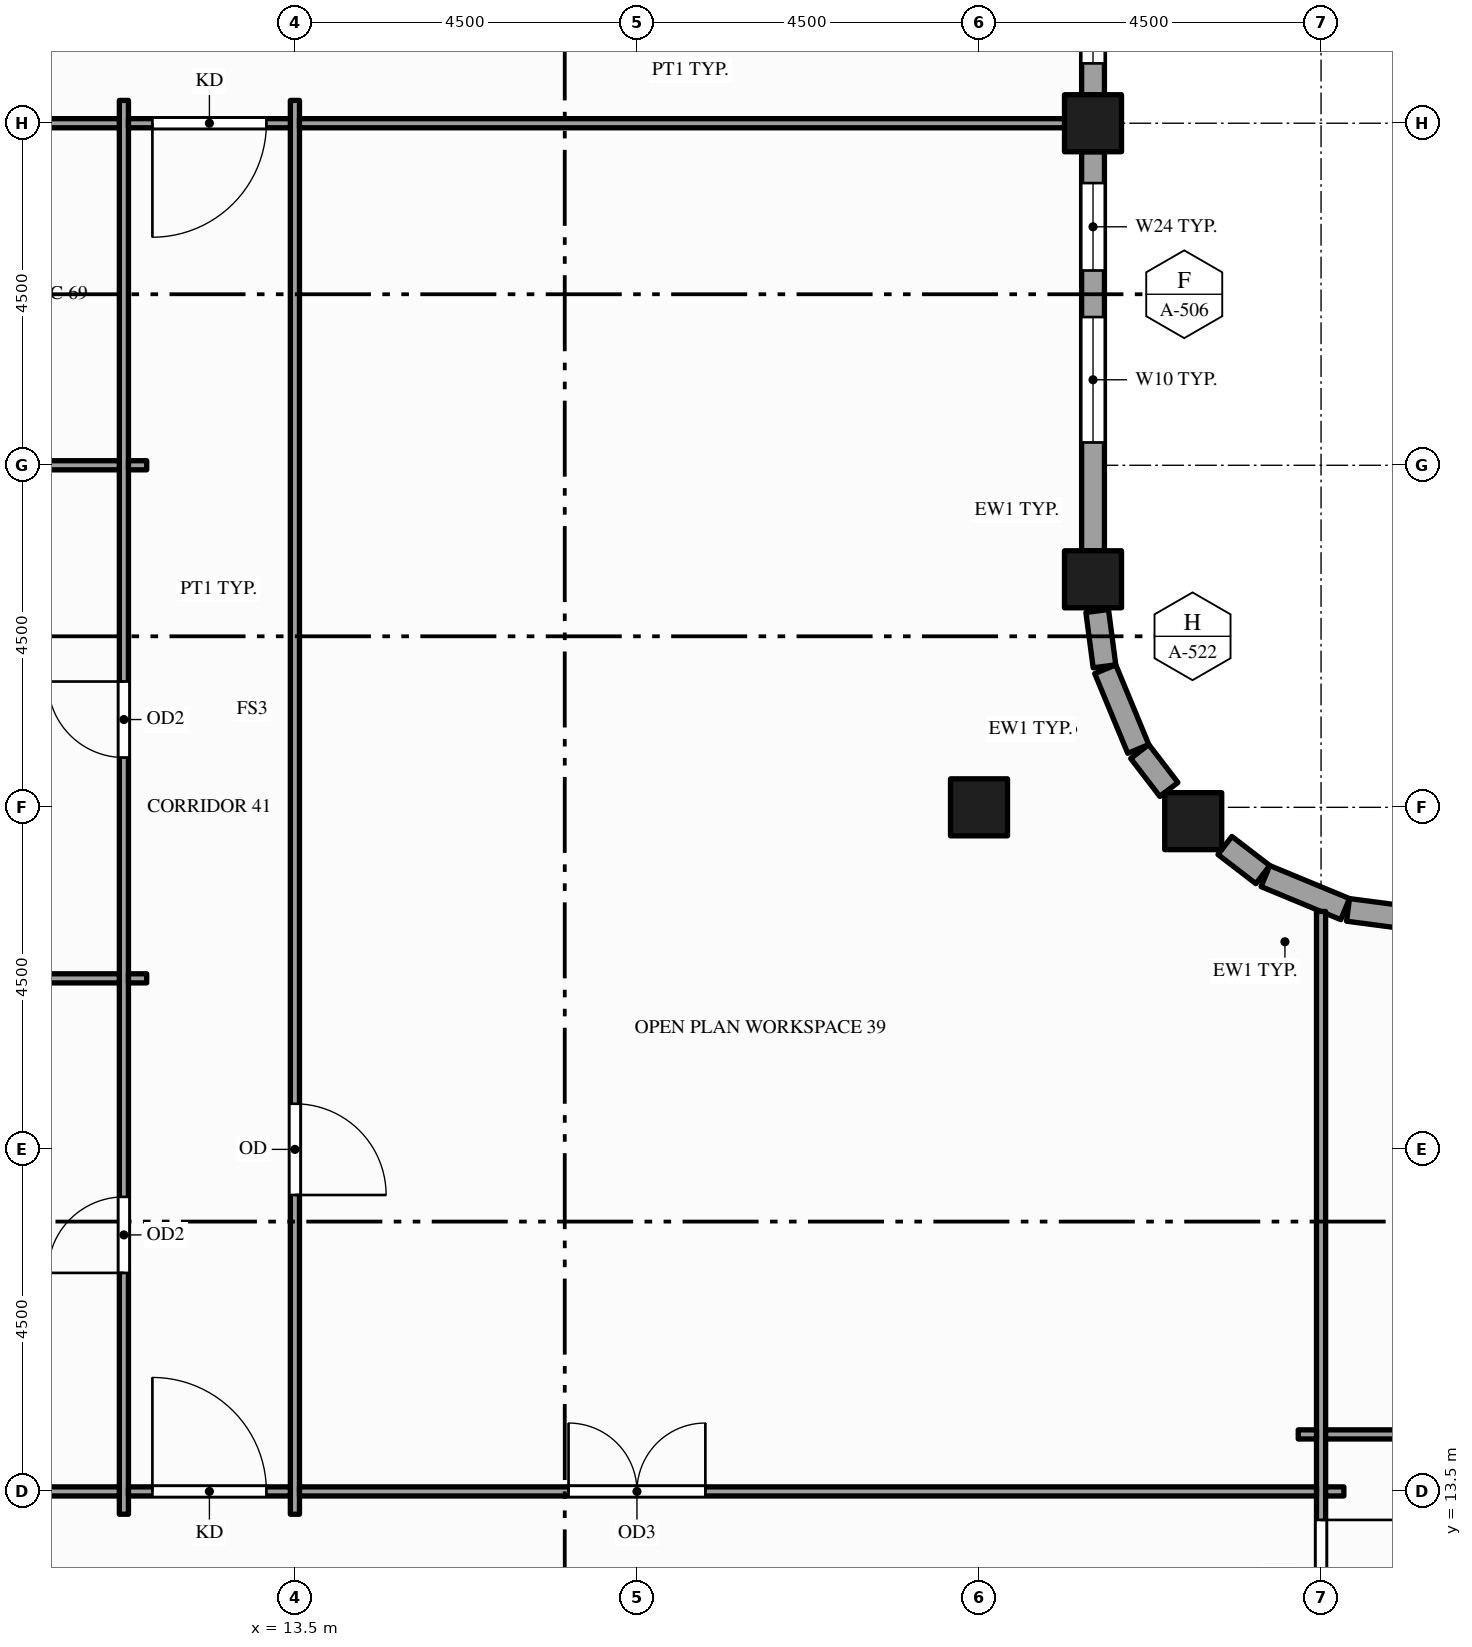
"""IFC4 building model, lengths in metres.
Left out: names, types, materials, properties, quantities, classifications, styles, units other than length and angle.
Written with IfcOpenShell. Run it as: python <this file> out.ifc"""

import sys

from ifc_helpers import new_model, si_unit, direction, frame, frame_2d, origin, origin_2d, place, context, subcontext, project, spatial, rectangle, hollow_rectangle, extrude, element, fill, save


model = new_model("IFC4")
c1 = context("Model", 3, precision=1e-05, world=origin(), true_north=direction((0.0, 1.0)))
c2 = subcontext(c1, "Body", "Model", "MODEL_VIEW")
j1 = project(units=[si_unit("LENGTHUNIT", "METRE"), si_unit("PLANEANGLEUNIT", "RADIAN")], contexts=[c1])
p1 = place(None, origin())
s1 = spatial("IfcSite", under=j1, at=p1, CompositionType="ELEMENT")
p2 = place(p1, origin())
s2 = spatial("IfcBuilding", under=s1, at=p2, CompositionType="ELEMENT")
p3 = place(p2, frame((0.0, 0.0, 211.0)))
s3 = spatial("IfcBuildingStorey", under=s2, at=p3, CompositionType="ELEMENT", Elevation=211.0)
for number, where, z_axis, x_axis in (
    (1, (22.5, 22.5, -0.15), (0.0, 0.0, 1.0), (1.0, 0.0, 0.0)),
    (2, (24.0, 25.5, -0.15), (0.0, 0.0, 1.0), (1.0, 0.0, 0.0)),
    (3, (24.0, 31.5, -0.15), (0.0, 0.0, 1.0), (1.0, 0.0, 0.0)),
    (4, (25.318, 22.318, -0.15), (0.0, 0.0, 1.0), (1.0, 0.0, 0.0)),
):
    element("IfcColumn", number, at=place(p3, frame(where, z_axis=z_axis, x_axis=x_axis)), inside=s3, PredefinedType="COLUMN", context=c2, shape_type="SweptSolid", body=[
        extrude(hollow_rectangle(XDim=0.75, YDim=0.75, WallThickness=0.036, at=origin_2d()), origin(), (0.0, 0.0, 1.0), 4.0),
    ])
p4 = place(p3, frame((28.083, 21.055, 0.0), z_axis=(0.0, 0.0, 1.0), x_axis=(-0.99142711513, 0.130660917588, 0.0)))
e5 = element("IfcWall", 5, at=p4, inside=s3, PredefinedType="STANDARD", context=c2, shape_type="SweptSolid", body=[
    extrude(rectangle(XDim=0.734, YDim=0.3, at=frame_2d((0.367, 0.0))), origin(), (0.0, 0.0, 1.0), 3.157),
])
p5 = place(p3, frame((27.317, 21.161, 0.0), z_axis=(0.0, 0.0, 1.0), x_axis=(-0.923914616768, 0.382598720491, 0.0)))
e6 = element("IfcWall", 6, at=p5, inside=s3, PredefinedType="STANDARD", context=c2, shape_type="SweptSolid", body=[
    extrude(rectangle(XDim=1.135, YDim=0.3, at=frame_2d((0.568, 0.0))), origin(), (0.0, 0.0, 1.0), 2.87),
])
p6 = place(p3, frame((26.234, 21.615, 0.0), z_axis=(0.0, 0.0, 1.0), x_axis=(-0.793575131083, 0.608472276547, 0.0)))
e7 = element("IfcWall", 7, at=p6, inside=s3, PredefinedType="STANDARD", context=c2, shape_type="SweptSolid", body=[
    extrude(rectangle(XDim=0.629, YDim=0.3, at=frame_2d((0.314, 0.0))), origin(), (0.0, 0.0, 1.0), 3.157),
])
p7 = place(p3, frame((24.998, 22.735, 0.0), z_axis=(0.0, 0.0, 1.0), x_axis=(-0.608472276547, 0.793575131083, 0.0)))
e8 = element("IfcWall", 8, at=p7, inside=s3, PredefinedType="STANDARD", context=c2, shape_type="SweptSolid", body=[
    extrude(rectangle(XDim=0.629, YDim=0.3, at=frame_2d((0.314, 0.0))), origin(), (0.0, 0.0, 1.0), 2.76),
])
p8 = place(p3, frame((24.595, 23.268, 0.0), z_axis=(0.0, 0.0, 1.0), x_axis=(-0.382598720491, 0.923914616768, 0.0)))
e9 = element("IfcWall", 9, at=p8, inside=s3, PredefinedType="STANDARD", context=c2, shape_type="SweptSolid", body=[
    extrude(rectangle(XDim=1.135, YDim=0.3, at=frame_2d((0.568, 0.0))), origin(), (0.0, 0.0, 1.0), 2.76),
])
p9 = place(p3, frame((24.151, 24.355, 0.0), z_axis=(0.0, 0.0, 1.0), x_axis=(-0.130660917588, 0.99142711513, 0.0)))
e10 = element("IfcWall", 10, at=p9, inside=s3, PredefinedType="STANDARD", context=c2, shape_type="SweptSolid", body=[
    extrude(rectangle(XDim=0.734, YDim=0.3, at=frame_2d((0.367, 0.0))), origin(), (0.0, 0.0, 1.0), 3.157),
])
p10 = place(p3, frame((24.0, 25.875, 0.0), z_axis=(0.0, 0.0, 1.0), x_axis=(0.0, 1.0, 0.0)))
e11 = element("IfcWall", 11, at=p10, inside=s3, PredefinedType="STANDARD", context=c2, shape_type="SweptSolid", body=[
    extrude(rectangle(XDim=5.25, YDim=0.3, at=frame_2d((2.625, 0.0))), origin(), (0.0, 0.0, 1.0), 3.157),
])
p11 = place(p10, frame((1.425, 0.0, 0.9)))
e12 = element("IfcOpeningElement", 12, at=p11, cuts=e11, PredefinedType="OPENING", context=c2, shape_type="SweptSolid", body=[
    extrude(rectangle(XDim=1.65, YDim=2.0, at=frame_2d((0.825, 1.0))), frame((0.0, 0.16, 0.0), z_axis=(0.0, -1.0, 0.0), x_axis=(1.0, 0.0, 0.0)), (0.0, 0.0, 1.0), 0.32),
])
p12 = place(p10, frame((3.688, 0.0, 0.9)))
e13 = element("IfcOpeningElement", 13, at=p12, cuts=e11, PredefinedType="OPENING", context=c2, shape_type="SweptSolid", body=[
    extrude(rectangle(XDim=1.15, YDim=2.0, at=frame_2d((0.575, 1.0))), frame((0.0, 0.16, 0.0), z_axis=(0.0, -1.0, 0.0), x_axis=(1.0, 0.0, 0.0)), (0.0, 0.0, 1.0), 0.32),
])
p13 = place(p3, frame((24.0, 31.875, 0.0), z_axis=(0.0, 0.0, 1.0), x_axis=(0.0, 1.0, 0.0)))
e14 = element("IfcWall", 14, at=p13, inside=s3, PredefinedType="STANDARD", context=c2, shape_type="SweptSolid", body=[
    extrude(rectangle(XDim=3.75, YDim=0.3, at=frame_2d((1.875, 0.0))), origin(), (0.0, 0.0, 1.0), 3.157),
])
p14 = place(p13, frame((0.413, 0.0, 0.9)))
e15 = element("IfcOpeningElement", 15, at=p14, cuts=e14, PredefinedType="OPENING", context=c2, shape_type="SweptSolid", body=[
    extrude(rectangle(XDim=1.15, YDim=2.0, at=frame_2d((0.575, 1.0))), frame((0.0, 0.16, 0.0), z_axis=(0.0, -1.0, 0.0), x_axis=(1.0, 0.0, 0.0)), (0.0, 0.0, 1.0), 0.32),
])
p15 = place(p13, frame((2.188, 0.0, 0.9)))
e16 = element("IfcOpeningElement", 16, at=p15, cuts=e14, PredefinedType="OPENING", context=c2, shape_type="SweptSolid", body=[
    extrude(rectangle(XDim=1.15, YDim=2.0, at=frame_2d((0.575, 1.0))), frame((0.0, 0.16, 0.0), z_axis=(0.0, -1.0, 0.0), x_axis=(1.0, 0.0, 0.0)), (0.0, 0.0, 1.0), 0.32),
])
p16 = place(p3, frame((11.25, 13.2, 0.0), z_axis=(0.0, 0.0, 1.0), x_axis=(0.0, 1.0, 0.0)))
e17 = element("IfcWall", 17, at=p16, inside=s3, PredefinedType="PARTITIONING", context=c2, shape_type="SweptSolid", body=[
    extrude(rectangle(XDim=18.6, YDim=0.12, at=frame_2d((9.3, 0.0))), origin(), (0.0, 0.0, 1.0), 2.6),
])
p17 = place(p16, frame((3.175, 0.0, 0.0)))
e18 = element("IfcOpeningElement", 18, at=p17, cuts=e17, PredefinedType="OPENING", context=c2, shape_type="SweptSolid", body=[
    extrude(rectangle(XDim=1.0, YDim=2.1, at=frame_2d((0.5, 1.05))), frame((0.0, 0.07, 0.0), z_axis=(0.0, -1.0, 0.0), x_axis=(1.0, 0.0, 0.0)), (0.0, 0.0, 1.0), 0.14),
])
p18 = place(p16, frame((9.955, 0.0, 0.0)))
e19 = element("IfcOpeningElement", 19, at=p18, cuts=e17, PredefinedType="OPENING", context=c2, shape_type="SweptSolid", body=[
    extrude(rectangle(XDim=1.0, YDim=2.1, at=frame_2d((0.5, 1.05))), frame((0.0, 0.07, 0.0), z_axis=(0.0, -1.0, 0.0), x_axis=(1.0, 0.0, 0.0)), (0.0, 0.0, 1.0), 0.14),
])
p19 = place(p3, frame((13.5, 13.2, 0.0), z_axis=(0.0, 0.0, 1.0), x_axis=(0.0, 1.0, 0.0)))
e20 = element("IfcWall", 20, at=p19, inside=s3, PredefinedType="PARTITIONING", context=c2, shape_type="SweptSolid", body=[
    extrude(rectangle(XDim=18.6, YDim=0.12, at=frame_2d((9.3, 0.0))), origin(), (0.0, 0.0, 1.0), 2.6),
])
p20 = place(p19, frame((4.2, 0.0, 0.0)))
e21 = element("IfcOpeningElement", 21, at=p20, cuts=e20, PredefinedType="OPENING", context=c2, shape_type="SweptSolid", body=[
    extrude(rectangle(XDim=1.2, YDim=2.1, at=frame_2d((0.6, 1.05))), frame((0.0, 0.07, 0.0), z_axis=(0.0, -1.0, 0.0), x_axis=(1.0, 0.0, 0.0)), (0.0, 0.0, 1.0), 0.14),
])
p21 = place(p3, frame((27.0, -1.35, 0.0), z_axis=(0.0, 0.0, 1.0), x_axis=(0.0, 1.0, 0.0)))
e22 = element("IfcWall", 22, at=p21, inside=s3, PredefinedType="PARTITIONING", context=c2, shape_type="SweptSolid", body=[
    extrude(rectangle(XDim=22.48, YDim=0.12, at=frame_2d((11.24, 0.0))), origin(), (0.0, 0.0, 1.0), 2.87),
])
p22 = place(p21, frame((12.975, 0.0, 0.0)))
e23 = element("IfcOpeningElement", 23, at=p22, cuts=e22, PredefinedType="OPENING", context=c2, shape_type="SweptSolid", body=[
    extrude(rectangle(XDim=1.5, YDim=2.1, at=frame_2d((0.75, 1.05))), frame((0.0, 0.07, 0.0), z_axis=(0.0, -1.0, 0.0), x_axis=(1.0, 0.0, 0.0)), (0.0, 0.0, 1.0), 0.14),
])
p23 = place(p3, frame((0.15, 13.5, 0.0), z_axis=(0.0, 0.0, 1.0), x_axis=(1.0, 0.0, 0.0)))
e24 = element("IfcWall", 24, at=p23, inside=s3, PredefinedType="PARTITIONING", context=c2, shape_type="SweptSolid", body=[
    extrude(rectangle(XDim=11.04, YDim=0.12, at=frame_2d((5.52, 0.0))), origin(), (0.0, 0.0, 1.0), 2.87),
])
p24 = place(p3, frame((11.31, 13.5, 0.0), z_axis=(0.0, 0.0, 1.0), x_axis=(1.0, 0.0, 0.0)))
e25 = element("IfcWall", 25, at=p24, inside=s3, PredefinedType="PARTITIONING", context=c2, shape_type="SweptSolid", body=[
    extrude(rectangle(XDim=2.13, YDim=0.12, at=frame_2d((1.065, 0.0))), origin(), (0.0, 0.0, 1.0), 2.87),
])
p25 = place(p24, frame((0.315, 0.0, 0.0)))
e26 = element("IfcOpeningElement", 26, at=p25, cuts=e25, PredefinedType="OPENING", context=c2, shape_type="SweptSolid", body=[
    extrude(rectangle(XDim=1.5, YDim=2.1, at=frame_2d((0.75, 1.05))), frame((0.0, 0.07, 0.0), z_axis=(0.0, -1.0, 0.0), x_axis=(1.0, 0.0, 0.0)), (0.0, 0.0, 1.0), 0.14),
])
p26 = place(p3, frame((13.56, 13.5, 0.0), z_axis=(0.0, 0.0, 1.0), x_axis=(1.0, 0.0, 0.0)))
e27 = element("IfcWall", 27, at=p26, inside=s3, PredefinedType="PARTITIONING", context=c2, shape_type="SweptSolid", body=[
    extrude(rectangle(XDim=13.38, YDim=0.12, at=frame_2d((6.69, 0.0))), origin(), (0.0, 0.0, 1.0), 2.76),
])
p27 = place(p26, frame((3.54, 0.0, 0.0)))
e28 = element("IfcOpeningElement", 28, at=p27, cuts=e27, PredefinedType="OPENING", context=c2, shape_type="SweptSolid", body=[
    extrude(rectangle(XDim=1.8, YDim=2.1, at=frame_2d((0.9, 1.05))), frame((0.0, 0.07, 0.0), z_axis=(0.0, -1.0, 0.0), x_axis=(1.0, 0.0, 0.0)), (0.0, 0.0, 1.0), 0.14),
])
for number, where, z_axis, x_axis in (
    (29, (27.06, 13.5, 0.0), (0.0, 0.0, 1.0), (1.0, 0.0, 0.0)),
    (30, (26.7, 14.25, 0.0), (0.0, 0.0, 1.0), (1.0, 0.0, 0.0)),
):
    element("IfcWall", number, at=place(p3, frame(where, z_axis=z_axis, x_axis=x_axis)), inside=s3, PredefinedType="PARTITIONING", context=c2, shape_type="SweptSolid", body=[
        extrude(rectangle(XDim=0.24, YDim=0.12, at=frame_2d((0.12, 0.0))), origin(), (0.0, 0.0, 1.0), 2.87),
    ])
p28 = place(p3, frame((27.06, 14.25, 0.0), z_axis=(0.0, 0.0, 1.0), x_axis=(1.0, 0.0, 0.0)))
e31 = element("IfcWall", 31, at=p28, inside=s3, PredefinedType="PARTITIONING", context=c2, shape_type="SweptSolid", body=[
    extrude(rectangle(XDim=2.13, YDim=0.12, at=frame_2d((1.065, 0.0))), origin(), (0.0, 0.0, 1.0), 2.87),
])
p29 = place(p3, frame((0.15, 20.25, 0.0), z_axis=(0.0, 0.0, 1.0), x_axis=(1.0, 0.0, 0.0)))
e32 = element("IfcWall", 32, at=p29, inside=s3, PredefinedType="PARTITIONING", context=c2, shape_type="SweptSolid", body=[
    extrude(rectangle(XDim=11.04, YDim=0.12, at=frame_2d((5.52, 0.0))), origin(), (0.0, 0.0, 1.0), 2.87),
])
p30 = place(p3, frame((11.31, 20.25, 0.0), z_axis=(0.0, 0.0, 1.0), x_axis=(1.0, 0.0, 0.0)))
e33 = element("IfcWall", 33, at=p30, inside=s3, PredefinedType="PARTITIONING", context=c2, shape_type="SweptSolid", body=[
    extrude(rectangle(XDim=0.24, YDim=0.12, at=frame_2d((0.12, 0.0))), origin(), (0.0, 0.0, 1.0), 2.87),
])
p31 = place(p3, frame((8.06, 27.0, 0.0), z_axis=(0.0, 0.0, 1.0), x_axis=(1.0, 0.0, 0.0)))
e34 = element("IfcWall", 34, at=p31, inside=s3, PredefinedType="PARTITIONING", context=c2, shape_type="SweptSolid", body=[
    extrude(rectangle(XDim=3.13, YDim=0.12, at=frame_2d((1.565, 0.0))), origin(), (0.0, 0.0, 1.0), 2.87),
])
p32 = place(p3, frame((11.31, 27.0, 0.0), z_axis=(0.0, 0.0, 1.0), x_axis=(1.0, 0.0, 0.0)))
e35 = element("IfcWall", 35, at=p32, inside=s3, PredefinedType="PARTITIONING", context=c2, shape_type="SweptSolid", body=[
    extrude(rectangle(XDim=0.24, YDim=0.12, at=frame_2d((0.12, 0.0))), origin(), (0.0, 0.0, 1.0), 2.87),
])
p33 = place(p3, frame((8.06, 31.5, 0.0), z_axis=(0.0, 0.0, 1.0), x_axis=(1.0, 0.0, 0.0)))
e36 = element("IfcWall", 36, at=p33, inside=s3, PredefinedType="PARTITIONING", context=c2, shape_type="SweptSolid", body=[
    extrude(rectangle(XDim=3.13, YDim=0.12, at=frame_2d((1.565, 0.0))), origin(), (0.0, 0.0, 1.0), 2.87),
])
p34 = place(p33, frame((1.065, 0.0, 0.0)))
e37 = element("IfcOpeningElement", 37, at=p34, cuts=e36, PredefinedType="OPENING", context=c2, shape_type="SweptSolid", body=[
    extrude(rectangle(XDim=1.0, YDim=2.1, at=frame_2d((0.5, 1.05))), frame((0.0, 0.07, 0.0), z_axis=(0.0, -1.0, 0.0), x_axis=(1.0, 0.0, 0.0)), (0.0, 0.0, 1.0), 0.14),
])
p35 = place(p3, frame((11.31, 31.5, 0.0), z_axis=(0.0, 0.0, 1.0), x_axis=(1.0, 0.0, 0.0)))
e38 = element("IfcWall", 38, at=p35, inside=s3, PredefinedType="PARTITIONING", context=c2, shape_type="SweptSolid", body=[
    extrude(rectangle(XDim=2.13, YDim=0.12, at=frame_2d((1.065, 0.0))), origin(), (0.0, 0.0, 1.0), 2.87),
])
p36 = place(p35, frame((0.315, 0.0, 0.0)))
e39 = element("IfcOpeningElement", 39, at=p36, cuts=e38, PredefinedType="OPENING", context=c2, shape_type="SweptSolid", body=[
    extrude(rectangle(XDim=1.5, YDim=2.1, at=frame_2d((0.75, 1.05))), frame((0.0, 0.07, 0.0), z_axis=(0.0, -1.0, 0.0), x_axis=(1.0, 0.0, 0.0)), (0.0, 0.0, 1.0), 0.14),
])
p37 = place(p3, frame((13.56, 31.5, 0.0), z_axis=(0.0, 0.0, 1.0), x_axis=(1.0, 0.0, 0.0)))
e40 = element("IfcWall", 40, at=p37, inside=s3, PredefinedType="PARTITIONING", context=c2, shape_type="SweptSolid", body=[
    extrude(rectangle(XDim=10.29, YDim=0.12, at=frame_2d((5.145, 0.0))), origin(), (0.0, 0.0, 1.0), 2.87),
])
p38 = place(p11, origin())
e41 = element("IfcWindow", 41, at=p38, inside=s3, PartitioningType="SINGLE_PANEL", PredefinedType="WINDOW", context=c2, shape_type="SweptSolid", body=[
    extrude(rectangle(XDim=1.65, YDim=2.0, at=frame_2d((0.825, 1.0))), frame((0.0, 0.03, 0.0), z_axis=(0.0, -1.0, 0.0), x_axis=(1.0, 0.0, 0.0)), (0.0, 0.0, 1.0), 0.06),
])
fill(e12, e41)
p39 = place(p12, origin())
e42 = element("IfcWindow", 42, at=p39, inside=s3, PartitioningType="SINGLE_PANEL", PredefinedType="WINDOW", context=c2, shape_type="SweptSolid", body=[
    extrude(rectangle(XDim=1.15, YDim=2.0, at=frame_2d((0.575, 1.0))), frame((0.0, 0.03, 0.0), z_axis=(0.0, -1.0, 0.0), x_axis=(1.0, 0.0, 0.0)), (0.0, 0.0, 1.0), 0.06),
])
fill(e13, e42)
p40 = place(p14, origin())
e43 = element("IfcWindow", 43, at=p40, inside=s3, PartitioningType="SINGLE_PANEL", PredefinedType="WINDOW", context=c2, shape_type="SweptSolid", body=[
    extrude(rectangle(XDim=1.15, YDim=2.0, at=frame_2d((0.575, 1.0))), frame((0.0, 0.03, 0.0), z_axis=(0.0, -1.0, 0.0), x_axis=(1.0, 0.0, 0.0)), (0.0, 0.0, 1.0), 0.06),
])
fill(e15, e43)
p41 = place(p22, origin())
e44 = element("IfcDoor", 44, at=p41, inside=s3, OperationType="SINGLE_SWING_RIGHT", PredefinedType="DOOR", context=c2, shape_type="SweptSolid", body=[
    extrude(rectangle(XDim=1.5, YDim=2.1, at=frame_2d((0.75, 1.05))), frame((0.0, 0.025, 0.0), z_axis=(0.0, -1.0, 0.0), x_axis=(1.0, 0.0, 0.0)), (0.0, 0.0, 1.0), 0.05),
])
fill(e23, e44)
p42 = place(p27, origin())
e45 = element("IfcDoor", 45, at=p42, inside=s3, OperationType="DOUBLE_DOOR_SINGLE_SWING", PredefinedType="DOOR", context=c2, shape_type="SweptSolid", body=[
    extrude(rectangle(XDim=1.8, YDim=2.1, at=frame_2d((0.9, 1.05))), frame((0.0, 0.025, 0.0), z_axis=(0.0, -1.0, 0.0), x_axis=(1.0, 0.0, 0.0)), (0.0, 0.0, 1.0), 0.05),
])
fill(e28, e45)
p43 = place(p25, origin())
e46 = element("IfcDoor", 46, at=p43, inside=s3, OperationType="SINGLE_SWING_LEFT", PredefinedType="DOOR", context=c2, shape_type="SweptSolid", body=[
    extrude(rectangle(XDim=1.5, YDim=2.1, at=frame_2d((0.75, 1.05))), frame((0.0, 0.025, 0.0), z_axis=(0.0, -1.0, 0.0), x_axis=(1.0, 0.0, 0.0)), (0.0, 0.0, 1.0), 0.05),
])
fill(e26, e46)
p44 = place(p36, origin())
e47 = element("IfcDoor", 47, at=p44, inside=s3, OperationType="SINGLE_SWING_LEFT", PredefinedType="DOOR", context=c2, shape_type="SweptSolid", body=[
    extrude(rectangle(XDim=1.5, YDim=2.1, at=frame_2d((0.75, 1.05))), frame((0.0, 0.025, 0.0), z_axis=(0.0, -1.0, 0.0), x_axis=(1.0, 0.0, 0.0)), (0.0, 0.0, 1.0), 0.05),
])
fill(e39, e47)
p45 = place(p17, origin())
e48 = element("IfcDoor", 48, at=p45, inside=s3, OperationType="SINGLE_SWING_LEFT", PredefinedType="DOOR", context=c2, shape_type="SweptSolid", body=[
    extrude(rectangle(XDim=1.0, YDim=2.1, at=frame_2d((0.5, 1.05))), frame((0.0, 0.025, 0.0), z_axis=(0.0, -1.0, 0.0), x_axis=(1.0, 0.0, 0.0)), (0.0, 0.0, 1.0), 0.05),
])
fill(e18, e48)
p46 = place(p18, origin())
e49 = element("IfcDoor", 49, at=p46, inside=s3, OperationType="SINGLE_SWING_RIGHT", PredefinedType="DOOR", context=c2, shape_type="SweptSolid", body=[
    extrude(rectangle(XDim=1.0, YDim=2.1, at=frame_2d((0.5, 1.05))), frame((0.0, 0.025, 0.0), z_axis=(0.0, -1.0, 0.0), x_axis=(1.0, 0.0, 0.0)), (0.0, 0.0, 1.0), 0.05),
])
fill(e19, e49)
p47 = place(p20, origin())
e50 = element("IfcDoor", 50, at=p47, inside=s3, OperationType="SINGLE_SWING_LEFT", PredefinedType="DOOR", context=c2, shape_type="SweptSolid", body=[
    extrude(rectangle(XDim=1.2, YDim=2.1, at=frame_2d((0.6, 1.05))), frame((0.0, 0.025, 0.0), z_axis=(0.0, -1.0, 0.0), x_axis=(1.0, 0.0, 0.0)), (0.0, 0.0, 1.0), 0.05),
])
fill(e21, e50)
save(model, sys.argv[1])
